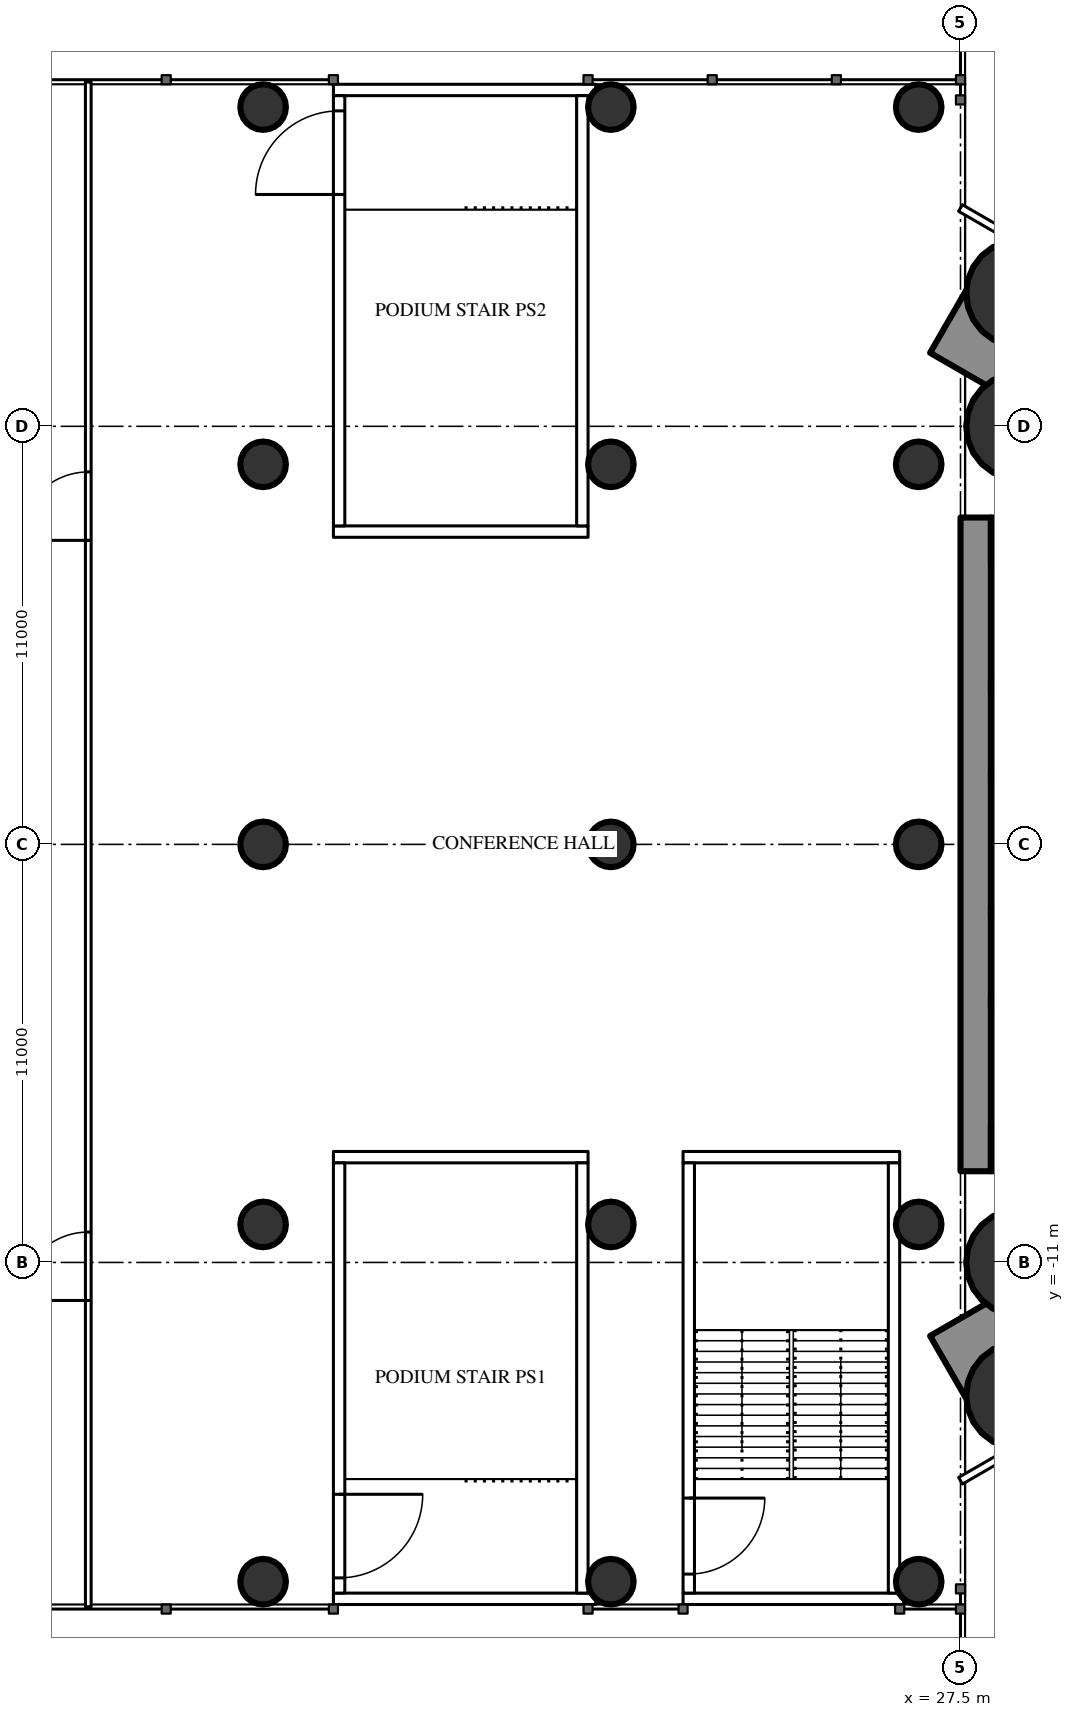
"""IFC4 building model, lengths in metres.
Left out: names, types, materials, properties, quantities, classifications, styles, units other than length and angle.
Written with IfcOpenShell. Run it as: python <this file> out.ifc"""

import sys

from ifc_helpers import new_model, si_unit, direction, frame, frame_2d, origin, origin_2d, place, context, subcontext, project, spatial, rectangle, circle, hollow_circle, extrude, element, fill, save


model = new_model("IFC4")
c1 = context("Model", 3, precision=1e-05, world=origin(), true_north=direction((0.0, 1.0)))
c2 = subcontext(c1, "Body", "Model", "MODEL_VIEW")
j1 = project(units=[si_unit("LENGTHUNIT", "METRE"), si_unit("PLANEANGLEUNIT", "RADIAN")], contexts=[c1])
p1 = place(None, origin())
s1 = spatial("IfcSite", under=j1, at=p1, CompositionType="ELEMENT")
p2 = place(p1, origin())
s2 = spatial("IfcBuilding", under=s1, at=p2, CompositionType="ELEMENT")
p3 = place(p2, frame((0.0, 0.0, 7.2)))
s3 = spatial("IfcBuildingStorey", under=s2, at=p3, CompositionType="ELEMENT", Elevation=7.2)
for number, where, z_axis, x_axis in (
    (1, (29.05, 11.0, 0.0), (0.0, 0.0, 1.0), (1.0, 0.0, 0.0)),
    (2, (29.05, -11.0, 0.0), (0.0, 0.0, 1.0), (1.0, 0.0, 0.0)),
    (3, (29.05, -14.5, 0.0), (0.0, 0.0, 1.0), (1.0, 0.0, 0.0)),
    (4, (29.05, 14.5, 0.0), (0.0, 0.0, 1.0), (1.0, 0.0, 0.0)),
):
    element("IfcColumn", number, at=place(p3, frame(where, z_axis=z_axis, x_axis=x_axis)), inside=s3, PredefinedType="COLUMN", context=c2, shape_type="SweptSolid", body=[
        extrude(hollow_circle(Radius=1.4, WallThickness=0.12, at=origin_2d()), origin(), (0.0, 0.0, 1.0), 5.4),
    ])
p4 = place(p3, frame((27.9, -8.6, 0.0), z_axis=(0.0, 0.0, 1.0), x_axis=(0.0, 1.0, 0.0)))
e5 = element("IfcWall", 5, at=p4, inside=s3, PredefinedType="SHEAR", context=c2, shape_type="SweptSolid", body=[
    extrude(rectangle(XDim=17.2, YDim=0.8, at=frame_2d((8.6, 0.0))), origin(), (0.0, 0.0, 1.0), 5.4),
])
p5 = place(p3, frame((28.3, -8.0, 0.0), z_axis=(0.0, 0.0, 1.0), x_axis=(1.0, 0.0, 0.0)))
e6 = element("IfcWall", 6, at=p5, inside=s3, PredefinedType="SHEAR", context=c2, shape_type="SweptSolid", body=[
    extrude(rectangle(XDim=8.4, YDim=1.2, at=frame_2d((4.2, 0.0))), origin(), (0.0, 0.0, 1.0), 5.4),
])
p6 = place(p5, frame((0.25, 0.0, 0.0)))
e7 = element("IfcOpeningElement", 7, at=p6, cuts=e6, PredefinedType="OPENING", context=c2, shape_type="SweptSolid", body=[
    extrude(rectangle(XDim=1.0, YDim=2.2, at=frame_2d((0.5, 1.1))), frame((0.0, 0.61, 0.0), z_axis=(0.0, -1.0, 0.0), x_axis=(1.0, 0.0, 0.0)), (0.0, 0.0, 1.0), 1.22),
])
p7 = place(p3, frame((28.3, 8.0, 0.0), z_axis=(0.0, 0.0, 1.0), x_axis=(1.0, 0.0, 0.0)))
e8 = element("IfcWall", 8, at=p7, inside=s3, PredefinedType="SHEAR", context=c2, shape_type="SweptSolid", body=[
    extrude(rectangle(XDim=8.4, YDim=1.2, at=frame_2d((4.2, 0.0))), origin(), (0.0, 0.0, 1.0), 5.4),
])
p8 = place(p7, frame((0.25, 0.0, 0.0)))
e9 = element("IfcOpeningElement", 9, at=p8, cuts=e8, PredefinedType="OPENING", context=c2, shape_type="SweptSolid", body=[
    extrude(rectangle(XDim=1.0, YDim=2.2, at=frame_2d((0.5, 1.1))), frame((0.0, 0.61, 0.0), z_axis=(0.0, -1.0, 0.0), x_axis=(1.0, 0.0, 0.0)), (0.0, 0.0, 1.0), 1.22),
])
for number, where, z_axis, x_axis in (
    (10, (28.3, -4.15, 0.0), (0.0, 0.0, 1.0), (1.0, 0.0, 0.0)),
    (11, (28.3, 4.15, 0.0), (0.0, 0.0, 1.0), (1.0, 0.0, 0.0)),
):
    element("IfcWall", number, at=place(p3, frame(where, z_axis=z_axis, x_axis=x_axis)), inside=s3, PredefinedType="SHEAR", context=c2, shape_type="SweptSolid", body=[
        extrude(rectangle(XDim=8.4, YDim=0.3, at=frame_2d((4.2, 0.0))), origin(), (0.0, 0.0, 1.0), 5.4),
    ])
for number, where, z_axis, x_axis in (
    (12, (28.3, -1.775, 0.0), (0.0, 0.0, 1.0), (1.0, 0.0, 0.0)),
    (13, (28.3, 1.775, 0.0), (0.0, 0.0, 1.0), (1.0, 0.0, 0.0)),
):
    element("IfcWall", number, at=place(p3, frame(where, z_axis=z_axis, x_axis=x_axis)), inside=s3, PredefinedType="SHEAR", context=c2, shape_type="SweptSolid", body=[
        extrude(rectangle(XDim=2.9, YDim=0.25, at=frame_2d((1.45, 0.0))), origin(), (0.0, 0.0, 1.0), 5.4),
    ])
p9 = place(p3, frame((27.2, -13.8, 0.0), z_axis=(0.0, 0.0, 1.0), x_axis=(0.866027159892, 0.499996958321, 0.0)))
e14 = element("IfcWall", 14, at=p9, inside=s3, PredefinedType="SHEAR", context=c2, shape_type="SweptSolid", body=[
    extrude(rectangle(XDim=27.947, YDim=2.0, at=frame_2d((13.973, 0.0))), origin(), (0.0, 0.0, 1.0), 5.4),
])
p10 = place(p9, frame((4.6, 0.0, 0.0)))
e15 = element("IfcOpeningElement", 15, at=p10, cuts=e14, PredefinedType="OPENING", context=c2, shape_type="SweptSolid", body=[
    extrude(rectangle(XDim=1.0, YDim=2.2, at=frame_2d((0.5, 1.1))), frame((0.0, 1.01, 0.0), z_axis=(0.0, -1.0, 0.0), x_axis=(1.0, 0.0, 0.0)), (0.0, 0.0, 1.0), 2.02),
])
p11 = place(p9, frame((13.395, 0.0, 0.0)))
e16 = element("IfcOpeningElement", 16, at=p11, cuts=e14, PredefinedType="OPENING", context=c2, shape_type="SweptSolid", body=[
    extrude(rectangle(XDim=1.8, YDim=2.2, at=frame_2d((0.9, 1.1))), frame((0.0, 1.01, 0.0), z_axis=(0.0, -1.0, 0.0), x_axis=(1.0, 0.0, 0.0)), (0.0, 0.0, 1.0), 2.02),
])
p12 = place(p3, frame((27.2, 13.8, 0.0), z_axis=(0.0, 0.0, 1.0), x_axis=(0.866024545924, -0.500001485854, 0.0)))
e17 = element("IfcWall", 17, at=p12, inside=s3, PredefinedType="SHEAR", context=c2, shape_type="SweptSolid", body=[
    extrude(rectangle(XDim=26.534, YDim=2.0, at=frame_2d((13.267, 0.0))), origin(), (0.0, 0.0, 1.0), 5.4),
])
p13 = place(p12, frame((4.6, 0.0, 0.0)))
e18 = element("IfcOpeningElement", 18, at=p13, cuts=e17, PredefinedType="OPENING", context=c2, shape_type="SweptSolid", body=[
    extrude(rectangle(XDim=1.0, YDim=2.2, at=frame_2d((0.5, 1.1))), frame((0.0, 1.01, 0.0), z_axis=(0.0, -1.0, 0.0), x_axis=(1.0, 0.0, 0.0)), (0.0, 0.0, 1.0), 2.02),
])
p14 = place(p12, frame((13.395, 0.0, 0.0)))
e19 = element("IfcOpeningElement", 19, at=p14, cuts=e17, PredefinedType="OPENING", context=c2, shape_type="SweptSolid", body=[
    extrude(rectangle(XDim=1.8, YDim=2.2, at=frame_2d((0.9, 1.1))), frame((0.0, 1.01, 0.0), z_axis=(0.0, -1.0, 0.0), x_axis=(1.0, 0.0, 0.0)), (0.0, 0.0, 1.0), 2.02),
])
for number, where, z_axis, x_axis in (
    (20, (9.15, -19.4, 0.0), (0.0, 0.0, 1.0), (1.0, 0.0, 0.0)),
    (21, (9.15, -10.0, 0.0), (0.0, 0.0, 1.0), (1.0, 0.0, 0.0)),
    (22, (9.15, 0.0, 0.0), (0.0, 0.0, 1.0), (1.0, 0.0, 0.0)),
    (23, (9.15, 10.0, 0.0), (0.0, 0.0, 1.0), (1.0, 0.0, 0.0)),
    (24, (9.15, 19.4, 0.0), (0.0, 0.0, 1.0), (1.0, 0.0, 0.0)),
    (25, (18.3, -19.4, 0.0), (0.0, 0.0, 1.0), (1.0, 0.0, 0.0)),
    (26, (18.3, -10.0, 0.0), (0.0, 0.0, 1.0), (1.0, 0.0, 0.0)),
    (27, (18.3, 0.0, 0.0), (0.0, 0.0, 1.0), (1.0, 0.0, 0.0)),
    (28, (18.3, 10.0, 0.0), (0.0, 0.0, 1.0), (1.0, 0.0, 0.0)),
    (29, (18.3, 19.4, 0.0), (0.0, 0.0, 1.0), (1.0, 0.0, 0.0)),
    (30, (26.4, -19.4, 0.0), (0.0, 0.0, 1.0), (1.0, 0.0, 0.0)),
    (31, (26.4, -10.0, 0.0), (0.0, 0.0, 1.0), (1.0, 0.0, 0.0)),
    (32, (26.4, 0.0, 0.0), (0.0, 0.0, 1.0), (1.0, 0.0, 0.0)),
    (33, (26.4, 10.0, 0.0), (0.0, 0.0, 1.0), (1.0, 0.0, 0.0)),
    (34, (26.4, 19.4, 0.0), (0.0, 0.0, 1.0), (1.0, 0.0, 0.0)),
):
    element("IfcColumn", number, at=place(p3, frame(where, z_axis=z_axis, x_axis=x_axis)), inside=s3, PredefinedType="COLUMN", context=c2, shape_type="SweptSolid", body=[
        extrude(circle(Radius=0.6, at=origin_2d()), origin(), (0.0, 0.0, 1.0), 5.4),
    ])
p15 = place(p3, frame((27.5, -16.744, 0.0), z_axis=(0.0, 0.0, 1.0), x_axis=(0.866034395887, 0.499984424899, 0.0)))
e35 = element("IfcWall", 35, at=p15, inside=s3, PredefinedType="PARTITIONING", context=c2, shape_type="SweptSolid", body=[
    extrude(rectangle(XDim=3.469, YDim=0.2, at=frame_2d((1.734, 0.0))), origin(), (0.0, 0.0, 1.0), 5.05),
])
p16 = place(p3, frame((27.5, 16.744, 0.0), z_axis=(0.0, 0.0, 1.0), x_axis=(0.866035319247, -0.499982825521, 0.0)))
e36 = element("IfcWall", 36, at=p16, inside=s3, PredefinedType="PARTITIONING", context=c2, shape_type="SweptSolid", body=[
    extrude(rectangle(XDim=6.169, YDim=0.2, at=frame_2d((3.084, 0.0))), origin(), (0.0, 0.0, 1.0), 5.05),
])
p17 = place(p3, frame((4.55, -20.06, 0.0), z_axis=(0.0, 0.0, 1.0), x_axis=(0.0, 1.0, 0.0)))
e37 = element("IfcWall", 37, at=p17, inside=s3, PredefinedType="PARTITIONING", context=c2, shape_type="SweptSolid", body=[
    extrude(rectangle(XDim=40.12, YDim=0.15, at=frame_2d((20.06, 0.0))), origin(), (0.0, 0.0, 1.0), 4.05),
])
p18 = place(p17, frame((8.06, 0.0, 0.0)))
e38 = element("IfcOpeningElement", 38, at=p18, cuts=e37, PredefinedType="OPENING", context=c2, shape_type="SweptSolid", body=[
    extrude(rectangle(XDim=1.8, YDim=2.2, at=frame_2d((0.9, 1.1))), frame((0.0, 0.085, 0.0), z_axis=(0.0, -1.0, 0.0), x_axis=(1.0, 0.0, 0.0)), (0.0, 0.0, 1.0), 0.17),
])
p19 = place(p17, frame((28.06, 0.0, 0.0)))
e39 = element("IfcOpeningElement", 39, at=p19, cuts=e37, PredefinedType="OPENING", context=c2, shape_type="SweptSolid", body=[
    extrude(rectangle(XDim=1.8, YDim=2.2, at=frame_2d((0.9, 1.1))), frame((0.0, 0.085, 0.0), z_axis=(0.0, -1.0, 0.0), x_axis=(1.0, 0.0, 0.0)), (0.0, 0.0, 1.0), 0.17),
])
p20 = place(p3, frame((17.903, -19.85, 0.0), z_axis=(0.0, 0.0, 1.0), x_axis=(-1.0, 0.0, 0.0)))
e40 = element("IfcWall", 40, at=p20, inside=s3, PredefinedType="SOLIDWALL", context=c2, shape_type="SweptSolid", body=[
    extrude(rectangle(XDim=6.903, YDim=0.3, at=frame_2d((3.452, 0.0))), origin(), (0.0, 0.0, 1.0), 5.05),
])
p21 = place(p3, frame((11.0, -8.23, 0.0), z_axis=(0.0, 0.0, 1.0), x_axis=(1.0, 0.0, 0.0)))
e41 = element("IfcWall", 41, at=p21, inside=s3, PredefinedType="SOLIDWALL", context=c2, shape_type="SweptSolid", body=[
    extrude(rectangle(XDim=6.7, YDim=0.3, at=frame_2d((3.35, 0.0))), origin(), (0.0, 0.0, 1.0), 5.05),
])
p22 = place(p3, frame((11.15, -8.38, 0.0), z_axis=(0.0, 0.0, 1.0), x_axis=(0.0, -1.0, 0.0)))
e42 = element("IfcWall", 42, at=p22, inside=s3, PredefinedType="SOLIDWALL", context=c2, shape_type="SweptSolid", body=[
    extrude(rectangle(XDim=11.32, YDim=0.3, at=frame_2d((5.66, 0.0))), origin(), (0.0, 0.0, 1.0), 5.05),
])
p23 = place(p22, frame((8.72, 0.0, 0.0)))
e43 = element("IfcOpeningElement", 43, at=p23, cuts=e42, PredefinedType="OPENING", context=c2, shape_type="SweptSolid", body=[
    extrude(rectangle(XDim=2.2, YDim=2.2, at=frame_2d((1.1, 1.1))), frame((0.0, 0.16, 0.0), z_axis=(0.0, -1.0, 0.0), x_axis=(1.0, 0.0, 0.0)), (0.0, 0.0, 1.0), 0.32),
])
p24 = place(p3, frame((17.55, -8.38, 0.0), z_axis=(0.0, 0.0, 1.0), x_axis=(0.0, -1.0, 0.0)))
e44 = element("IfcWall", 44, at=p24, inside=s3, PredefinedType="SOLIDWALL", context=c2, shape_type="SweptSolid", body=[
    extrude(rectangle(XDim=11.32, YDim=0.3, at=frame_2d((5.66, 0.0))), origin(), (0.0, 0.0, 1.0), 5.05),
])
p25 = place(p3, frame((11.0, 19.85, 0.0), z_axis=(0.0, 0.0, 1.0), x_axis=(1.0, 0.0, 0.0)))
e45 = element("IfcWall", 45, at=p25, inside=s3, PredefinedType="SOLIDWALL", context=c2, shape_type="SweptSolid", body=[
    extrude(rectangle(XDim=6.903, YDim=0.3, at=frame_2d((3.452, 0.0))), origin(), (0.0, 0.0, 1.0), 5.05),
])
p26 = place(p3, frame((11.0, 8.23, 0.0), z_axis=(0.0, 0.0, 1.0), x_axis=(1.0, 0.0, 0.0)))
e46 = element("IfcWall", 46, at=p26, inside=s3, PredefinedType="SOLIDWALL", context=c2, shape_type="SweptSolid", body=[
    extrude(rectangle(XDim=6.7, YDim=0.3, at=frame_2d((3.35, 0.0))), origin(), (0.0, 0.0, 1.0), 5.05),
])
p27 = place(p3, frame((11.15, 8.38, 0.0), z_axis=(0.0, 0.0, 1.0), x_axis=(0.0, 1.0, 0.0)))
e47 = element("IfcWall", 47, at=p27, inside=s3, PredefinedType="SOLIDWALL", context=c2, shape_type="SweptSolid", body=[
    extrude(rectangle(XDim=11.32, YDim=0.3, at=frame_2d((5.66, 0.0))), origin(), (0.0, 0.0, 1.0), 5.05),
])
p28 = place(p27, frame((8.72, 0.0, 0.0)))
e48 = element("IfcOpeningElement", 48, at=p28, cuts=e47, PredefinedType="OPENING", context=c2, shape_type="SweptSolid", body=[
    extrude(rectangle(XDim=2.2, YDim=2.2, at=frame_2d((1.1, 1.1))), frame((0.0, 0.16, 0.0), z_axis=(0.0, -1.0, 0.0), x_axis=(1.0, 0.0, 0.0)), (0.0, 0.0, 1.0), 0.32),
])
p29 = place(p3, frame((17.55, 8.38, 0.0), z_axis=(0.0, 0.0, 1.0), x_axis=(0.0, 1.0, 0.0)))
e49 = element("IfcWall", 49, at=p29, inside=s3, PredefinedType="SOLIDWALL", context=c2, shape_type="SweptSolid", body=[
    extrude(rectangle(XDim=11.32, YDim=0.3, at=frame_2d((5.66, 0.0))), origin(), (0.0, 0.0, 1.0), 5.05),
])
p30 = place(p3, frame((26.003, -19.85, 0.0), z_axis=(0.0, 0.0, 1.0), x_axis=(-1.0, 0.0, 0.0)))
e50 = element("IfcWall", 50, at=p30, inside=s3, PredefinedType="SOLIDWALL", context=c2, shape_type="SweptSolid", body=[
    extrude(rectangle(XDim=5.803, YDim=0.3, at=frame_2d((2.902, 0.0))), origin(), (0.0, 0.0, 1.0), 3.55),
])
p31 = place(p3, frame((20.2, -8.23, 0.0), z_axis=(0.0, 0.0, 1.0), x_axis=(1.0, 0.0, 0.0)))
e51 = element("IfcWall", 51, at=p31, inside=s3, PredefinedType="SOLIDWALL", context=c2, shape_type="SweptSolid", body=[
    extrude(rectangle(XDim=5.7, YDim=0.3, at=frame_2d((2.85, 0.0))), origin(), (0.0, 0.0, 1.0), 5.05),
])
p32 = place(p3, frame((20.35, -8.38, 0.0), z_axis=(0.0, 0.0, 1.0), x_axis=(0.0, -1.0, 0.0)))
e52 = element("IfcWall", 52, at=p32, inside=s3, PredefinedType="SOLIDWALL", context=c2, shape_type="SweptSolid", body=[
    extrude(rectangle(XDim=11.32, YDim=0.3, at=frame_2d((5.66, 0.0))), origin(), (0.0, 0.0, 1.0), 5.05),
])
p33 = place(p32, frame((8.82, 0.0, 0.0)))
e53 = element("IfcOpeningElement", 53, at=p33, cuts=e52, PredefinedType="OPENING", context=c2, shape_type="SweptSolid", body=[
    extrude(rectangle(XDim=2.0, YDim=2.2, at=frame_2d((1.0, 1.1))), frame((0.0, 0.16, 0.0), z_axis=(0.0, -1.0, 0.0), x_axis=(1.0, 0.0, 0.0)), (0.0, 0.0, 1.0), 0.32),
])
p34 = place(p3, frame((25.75, -8.38, 0.0), z_axis=(0.0, 0.0, 1.0), x_axis=(0.0, -1.0, 0.0)))
e54 = element("IfcWall", 54, at=p34, inside=s3, PredefinedType="SOLIDWALL", context=c2, shape_type="SweptSolid", body=[
    extrude(rectangle(XDim=11.32, YDim=0.3, at=frame_2d((5.66, 0.0))), origin(), (0.0, 0.0, 1.0), 5.05),
])
p35 = place(p18, origin())
e55 = element("IfcDoor", 55, at=p35, inside=s3, OperationType="DOUBLE_DOOR_SINGLE_SWING", PredefinedType="DOOR", context=c2, shape_type="SweptSolid", body=[
    extrude(rectangle(XDim=1.8, YDim=2.2, at=frame_2d((0.9, 1.1))), frame((0.0, 0.025, 0.0), z_axis=(0.0, -1.0, 0.0), x_axis=(1.0, 0.0, 0.0)), (0.0, 0.0, 1.0), 0.05),
])
fill(e38, e55)
p36 = place(p19, origin())
e56 = element("IfcDoor", 56, at=p36, inside=s3, OperationType="DOUBLE_DOOR_SINGLE_SWING", PredefinedType="DOOR", context=c2, shape_type="SweptSolid", body=[
    extrude(rectangle(XDim=1.8, YDim=2.2, at=frame_2d((0.9, 1.1))), frame((0.0, 0.025, 0.0), z_axis=(0.0, -1.0, 0.0), x_axis=(1.0, 0.0, 0.0)), (0.0, 0.0, 1.0), 0.05),
])
fill(e39, e56)
p37 = place(p23, origin())
e57 = element("IfcDoor", 57, at=p37, inside=s3, OperationType="DOUBLE_DOOR_SINGLE_SWING", PredefinedType="DOOR", context=c2, shape_type="SweptSolid", body=[
    extrude(rectangle(XDim=2.2, YDim=2.2, at=frame_2d((1.1, 1.1))), frame((0.0, 0.025, 0.0), z_axis=(0.0, -1.0, 0.0), x_axis=(1.0, 0.0, 0.0)), (0.0, 0.0, 1.0), 0.05),
])
fill(e43, e57)
p38 = place(p28, origin())
e58 = element("IfcDoor", 58, at=p38, inside=s3, OperationType="DOUBLE_DOOR_SINGLE_SWING", PredefinedType="DOOR", context=c2, shape_type="SweptSolid", body=[
    extrude(rectangle(XDim=2.2, YDim=2.2, at=frame_2d((1.1, 1.1))), frame((0.0, 0.025, 0.0), z_axis=(0.0, -1.0, 0.0), x_axis=(1.0, 0.0, 0.0)), (0.0, 0.0, 1.0), 0.05),
])
fill(e48, e58)
p39 = place(p33, origin())
e59 = element("IfcDoor", 59, at=p39, inside=s3, OperationType="DOUBLE_DOOR_SINGLE_SWING", PredefinedType="DOOR", context=c2, shape_type="SweptSolid", body=[
    extrude(rectangle(XDim=2.0, YDim=2.2, at=frame_2d((1.0, 1.1))), frame((0.0, 0.025, 0.0), z_axis=(0.0, -1.0, 0.0), x_axis=(1.0, 0.0, 0.0)), (0.0, 0.0, 1.0), 0.05),
])
fill(e53, e59)
save(model, sys.argv[1])
